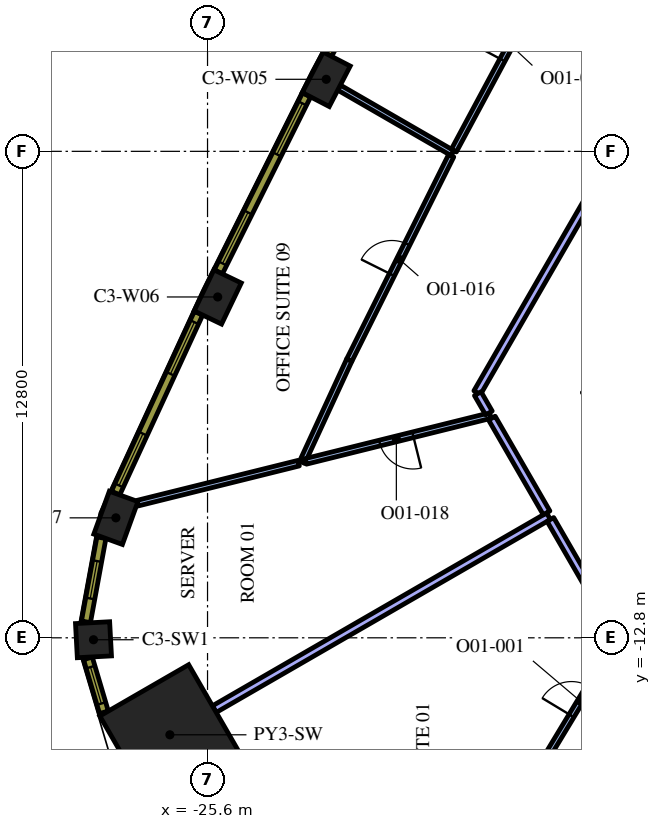
"""IFC4 building model, lengths in metres.
Left out: names, types, materials, properties, quantities, classifications, styles, units other than length and angle.
Written with IfcOpenShell. Run it as: python <this file> out.ifc"""

import sys

from ifc_helpers import new_model, si_unit, direction, frame, frame_2d, origin, origin_2d, place, context, subcontext, project, spatial, rectangle, extrude, element, fill, save


model = new_model("IFC4")
c1 = context("Model", 3, precision=1e-05, world=origin(), true_north=direction((0.0, 1.0)))
c2 = subcontext(c1, "Body", "Model", "MODEL_VIEW")
j1 = project(units=[si_unit("LENGTHUNIT", "METRE"), si_unit("PLANEANGLEUNIT", "RADIAN")], contexts=[c1])
p1 = place(None, origin())
s1 = spatial("IfcSite", under=j1, at=p1, CompositionType="ELEMENT")
p2 = place(p1, origin())
s2 = spatial("IfcBuilding", under=s1, at=p2, CompositionType="ELEMENT")
p3 = place(p2, frame((0.0, 0.0, 141.6)))
s3 = spatial("IfcBuildingStorey", under=s2, at=p3, CompositionType="ELEMENT", Elevation=141.6)
p4 = place(p3, frame((-26.591, -15.352, 0.0), z_axis=(0.0, 0.0, 1.0), x_axis=(-0.866025403784, -0.5, 0.0)))
e1 = element("IfcColumn", 1, at=p4, inside=s3, PredefinedType="COLUMN", context=c2, shape_type="SweptSolid", body=[
    extrude(rectangle(XDim=2.7, YDim=2.7, at=origin_2d()), origin(), (0.0, 0.0, 1.0), 4.2),
])
for number, where, z_axis, x_axis in (
    (2, (-22.476, 1.896, 0.0), (0.0, 0.0, 1.0), (-0.46, -0.888, 0.0)),
    (3, (-25.332, -3.832, 0.0), (0.0, 0.0, 1.0), (-0.433, -0.902, 0.0)),
    (4, (-28.012, -9.644, 0.0), (0.0, 0.0, 1.0), (-0.341, -0.94, 0.0)),
):
    element("IfcColumn", number, at=place(p3, frame(where, z_axis=z_axis, x_axis=x_axis)), inside=s3, PredefinedType="COLUMN", context=c2, shape_type="SweptSolid", body=[
        extrude(rectangle(XDim=1.2, YDim=0.8, at=origin_2d()), origin(), (0.0, 0.0, 1.0), 4.2),
    ])
p5 = place(p3, frame((-28.601, -12.851, 0.0), z_axis=(0.0, 0.0, 1.0), x_axis=(0.0533921468, -0.998573622053, 0.0)))
e5 = element("IfcColumn", 5, at=p5, inside=s3, PredefinedType="COLUMN", context=c2, shape_type="SweptSolid", body=[
    extrude(rectangle(XDim=0.9, YDim=0.9, at=origin_2d()), origin(), (0.0, 0.0, 1.0), 4.2),
])
p6 = place(p3, frame((-16.775, -16.097, 0.0), z_axis=(0.0, 0.0, 1.0), x_axis=(0.516793803756, 0.856109902057, 0.0)))
e6 = element("IfcWall", 6, at=p6, inside=s3, PredefinedType="PARTITIONING", context=c2, shape_type="SweptSolid", body=[
    extrude(rectangle(XDim=3.856, YDim=0.15, at=frame_2d((1.928, 0.0))), origin(), (0.0, 0.0, 1.0), 3.15),
])
p7 = place(p6, frame((1.456, 0.0, 0.0)))
e7 = element("IfcOpeningElement", 7, at=p7, cuts=e6, PredefinedType="OPENING", context=c2, shape_type="SweptSolid", body=[
    extrude(rectangle(XDim=0.9, YDim=2.1, at=frame_2d((0.45, 1.05))), frame((0.0, 0.085, 0.0), z_axis=(0.0, -1.0, 0.0), x_axis=(1.0, 0.0, 0.0)), (0.0, 0.0, 1.0), 0.17),
])
p8 = place(p3, frame((-25.421, -14.677, 0.0), z_axis=(0.0, 0.0, 1.0), x_axis=(0.866031435434, 0.499989552732, 0.0)))
e8 = element("IfcWall", 8, at=p8, inside=s3, PredefinedType="PARTITIONING", context=c2, shape_type="SweptSolid", body=[
    extrude(rectangle(XDim=10.154, YDim=0.2, at=frame_2d((5.077, 0.0))), origin(), (0.0, 0.0, 1.0), 3.15),
])
p9 = place(p3, frame((-16.578, -9.687, 0.0), z_axis=(0.0, 0.0, 1.0), x_axis=(0.499981686864, -0.86603597662, 0.0)))
e9 = element("IfcWall", 9, at=p9, inside=s3, PredefinedType="PARTITIONING", context=c2, shape_type="SweptSolid", body=[
    extrude(rectangle(XDim=3.506, YDim=0.2, at=frame_2d((1.753, 0.0))), origin(), (0.0, 0.0, 1.0), 3.15),
])
p10 = place(p3, frame((-19.154, -0.046, 0.0), z_axis=(0.0, 0.0, 1.0), x_axis=(-0.866051136095, 0.499955427682, 0.0)))
e10 = element("IfcWall", 10, at=p10, inside=s3, PredefinedType="PARTITIONING", context=c2, shape_type="SweptSolid", body=[
    extrude(rectangle(XDim=3.447, YDim=0.15, at=frame_2d((1.724, 0.0))), origin(), (0.0, 0.0, 1.0), 3.15),
])
p11 = place(p3, frame((-19.118, 0.02, 0.0), z_axis=(0.0, 0.0, 1.0), x_axis=(0.47251230182, 0.88132407469, 0.0)))
e11 = element("IfcWall", 11, at=p11, inside=s3, PredefinedType="PARTITIONING", context=c2, shape_type="SweptSolid", body=[
    extrude(rectangle(XDim=6.404, YDim=0.15, at=frame_2d((3.202, 0.0))), origin(), (0.0, 0.0, 1.0), 3.15),
])
p12 = place(p11, frame((2.704, 0.0, 0.0)))
e12 = element("IfcOpeningElement", 12, at=p12, cuts=e11, PredefinedType="OPENING", context=c2, shape_type="SweptSolid", body=[
    extrude(rectangle(XDim=0.9, YDim=2.1, at=frame_2d((0.45, 1.05))), frame((0.0, 0.085, 0.0), z_axis=(0.0, -1.0, 0.0), x_axis=(1.0, 0.0, 0.0)), (0.0, 0.0, 1.0), 0.17),
])
p13 = place(p3, frame((-21.869, -5.493, 0.0), z_axis=(0.0, 0.0, 1.0), x_axis=(0.44618972677, 0.894938393257, 0.0)))
e13 = element("IfcWall", 13, at=p13, inside=s3, PredefinedType="PARTITIONING", context=c2, shape_type="SweptSolid", body=[
    extrude(rectangle(XDim=6.011, YDim=0.15, at=frame_2d((3.005, 0.0))), origin(), (0.0, 0.0, 1.0), 3.15),
])
p14 = place(p13, frame((2.511, 0.0, 0.0)))
e14 = element("IfcOpeningElement", 14, at=p14, cuts=e13, PredefinedType="OPENING", context=c2, shape_type="SweptSolid", body=[
    extrude(rectangle(XDim=0.9, YDim=2.1, at=frame_2d((0.45, 1.05))), frame((0.0, 0.085, 0.0), z_axis=(0.0, -1.0, 0.0), x_axis=(1.0, 0.0, 0.0)), (0.0, 0.0, 1.0), 0.17),
])
p15 = place(p3, frame((-21.869, -5.493, 0.0), z_axis=(0.0, 0.0, 1.0), x_axis=(-0.418791486232, -0.908082425256, 0.0)))
e15 = element("IfcWall", 15, at=p15, inside=s3, PredefinedType="PARTITIONING", context=c2, shape_type="SweptSolid", body=[
    extrude(rectangle(XDim=2.961, YDim=0.15, at=frame_2d((1.48, 0.0))), origin(), (0.0, 0.0, 1.0), 3.15),
])
p16 = place(p3, frame((-23.203, -8.205, 0.0), z_axis=(0.0, 0.0, 1.0), x_axis=(-0.970525493326, -0.240998478843, 0.0)))
e16 = element("IfcWall", 16, at=p16, inside=s3, PredefinedType="PARTITIONING", context=c2, shape_type="SweptSolid", body=[
    extrude(rectangle(XDim=4.373, YDim=0.15, at=frame_2d((2.187, 0.0))), origin(), (0.0, 0.0, 1.0), 3.15),
])
p17 = place(p3, frame((-18.156, -6.952, 0.0), z_axis=(0.0, 0.0, 1.0), x_axis=(-0.97052275783, -0.241009494697, 0.0)))
e17 = element("IfcWall", 17, at=p17, inside=s3, PredefinedType="PARTITIONING", context=c2, shape_type="SweptSolid", body=[
    extrude(rectangle(XDim=5.007, YDim=0.15, at=frame_2d((2.504, 0.0))), origin(), (0.0, 0.0, 1.0), 3.15),
])
p18 = place(p17, frame((2.1, 0.0, 0.0)))
e18 = element("IfcOpeningElement", 18, at=p18, cuts=e17, PredefinedType="OPENING", context=c2, shape_type="SweptSolid", body=[
    extrude(rectangle(XDim=0.9, YDim=2.1, at=frame_2d((0.45, 1.05))), frame((0.0, 0.085, 0.0), z_axis=(0.0, -1.0, 0.0), x_axis=(1.0, 0.0, 0.0)), (0.0, 0.0, 1.0), 0.17),
])
p19 = place(p3, frame((-13.643, 2.069, 0.0), z_axis=(0.0, 0.0, 1.0), x_axis=(-0.500012305324, -0.866018299186, 0.0)))
e19 = element("IfcWall", 19, at=p19, inside=s3, PredefinedType="PARTITIONING", context=c2, shape_type="SweptSolid", body=[
    extrude(rectangle(XDim=9.721, YDim=0.2, at=frame_2d((4.861, 0.0))), origin(), (0.0, 0.0, 1.0), 3.15),
])
p20 = place(p3, frame((-18.489, -6.376, 0.0), z_axis=(0.0, 0.0, 1.0), x_axis=(0.499986503906, -0.866033195618, 0.0)))
e20 = element("IfcWall", 20, at=p20, inside=s3, PredefinedType="PARTITIONING", context=c2, shape_type="SweptSolid", body=[
    extrude(rectangle(XDim=0.587, YDim=0.2, at=frame_2d((0.293, 0.0))), origin(), (0.0, 0.0, 1.0), 3.15),
])
p21 = place(p3, frame((-18.118, -7.02, 0.0), z_axis=(0.0, 0.0, 1.0), x_axis=(0.500023335103, -0.866011930837, 0.0)))
e21 = element("IfcWall", 21, at=p21, inside=s3, PredefinedType="PARTITIONING", context=c2, shape_type="SweptSolid", body=[
    extrude(rectangle(XDim=2.88, YDim=0.2, at=frame_2d((1.44, 0.0))), origin(), (0.0, 0.0, 1.0), 3.15),
])
p22 = place(p3, frame((-19.977, 7.139, 0.0), z_axis=(0.0, 0.0, 1.0), x_axis=(-0.473349833294, -0.880874528704, 0.0)))
e22 = element("IfcWall", 22, at=p22, inside=s3, PredefinedType="SOLIDWALL", context=c2, shape_type="SweptSolid", body=[
    extrude(rectangle(XDim=5.204, YDim=0.24, at=frame_2d((2.602, 0.0))), origin(), (0.0, 0.0, 1.0), 3.95),
])
p23 = place(p22, frame((0.248, 0.0, 0.9)))
e23 = element("IfcOpeningElement", 23, at=p23, cuts=e22, PredefinedType="OPENING", context=c2, shape_type="SweptSolid", body=[
    extrude(rectangle(XDim=1.5, YDim=2.55, at=frame_2d((0.75, 1.275))), frame((0.0, 0.13, 0.0), z_axis=(0.0, -1.0, 0.0), x_axis=(1.0, 0.0, 0.0)), (0.0, 0.0, 1.0), 0.26),
])
p24 = place(p22, frame((3.455, 0.0, 0.9)))
e24 = element("IfcOpeningElement", 24, at=p24, cuts=e22, PredefinedType="OPENING", context=c2, shape_type="SweptSolid", body=[
    extrude(rectangle(XDim=1.5, YDim=2.55, at=frame_2d((0.75, 1.275))), frame((0.0, 0.13, 0.0), z_axis=(0.0, -1.0, 0.0), x_axis=(1.0, 0.0, 0.0)), (0.0, 0.0, 1.0), 0.26),
])
p25 = place(p3, frame((-22.994, 1.485, 0.0), z_axis=(0.0, 0.0, 1.0), x_axis=(-0.446256171312, -0.8949052629, 0.0)))
e25 = element("IfcWall", 25, at=p25, inside=s3, PredefinedType="SOLIDWALL", context=c2, shape_type="SweptSolid", body=[
    extrude(rectangle(XDim=5.203, YDim=0.24, at=frame_2d((2.602, 0.0))), origin(), (0.0, 0.0, 1.0), 3.95),
])
p26 = place(p25, frame((0.248, 0.0, 0.9)))
e26 = element("IfcOpeningElement", 26, at=p26, cuts=e25, PredefinedType="OPENING", context=c2, shape_type="SweptSolid", body=[
    extrude(rectangle(XDim=1.5, YDim=2.55, at=frame_2d((0.75, 1.275))), frame((0.0, 0.13, 0.0), z_axis=(0.0, -1.0, 0.0), x_axis=(1.0, 0.0, 0.0)), (0.0, 0.0, 1.0), 0.26),
])
p27 = place(p25, frame((3.455, 0.0, 0.9)))
e27 = element("IfcOpeningElement", 27, at=p27, cuts=e25, PredefinedType="OPENING", context=c2, shape_type="SweptSolid", body=[
    extrude(rectangle(XDim=1.5, YDim=2.55, at=frame_2d((0.75, 1.275))), frame((0.0, 0.13, 0.0), z_axis=(0.0, -1.0, 0.0), x_axis=(1.0, 0.0, 0.0)), (0.0, 0.0, 1.0), 0.26),
])
p28 = place(p3, frame((-25.837, -4.258, 0.0), z_axis=(0.0, 0.0, 1.0), x_axis=(-0.418722559465, -0.908114209885, 0.0)))
e28 = element("IfcWall", 28, at=p28, inside=s3, PredefinedType="SOLIDWALL", context=c2, shape_type="SweptSolid", body=[
    extrude(rectangle(XDim=5.213, YDim=0.24, at=frame_2d((2.606, 0.0))), origin(), (0.0, 0.0, 1.0), 3.95),
])
p29 = place(p28, frame((0.261, 0.0, 0.9)))
e29 = element("IfcOpeningElement", 29, at=p29, cuts=e28, PredefinedType="OPENING", context=c2, shape_type="SweptSolid", body=[
    extrude(rectangle(XDim=1.5, YDim=2.55, at=frame_2d((0.75, 1.275))), frame((0.0, 0.13, 0.0), z_axis=(0.0, -1.0, 0.0), x_axis=(1.0, 0.0, 0.0)), (0.0, 0.0, 1.0), 0.26),
])
p30 = place(p28, frame((3.492, 0.0, 0.9)))
e30 = element("IfcOpeningElement", 30, at=p30, cuts=e28, PredefinedType="OPENING", context=c2, shape_type="SweptSolid", body=[
    extrude(rectangle(XDim=1.5, YDim=2.55, at=frame_2d((0.75, 1.275))), frame((0.0, 0.13, 0.0), z_axis=(0.0, -1.0, 0.0), x_axis=(1.0, 0.0, 0.0)), (0.0, 0.0, 1.0), 0.26),
])
p31 = place(p3, frame((-28.393, -10.167, 0.0), z_axis=(0.0, 0.0, 1.0), x_axis=(-0.180737189259, -0.983531427265, 0.0)))
e31 = element("IfcWall", 31, at=p31, inside=s3, PredefinedType="SOLIDWALL", context=c2, shape_type="SweptSolid", body=[
    extrude(rectangle(XDim=2.25, YDim=0.24, at=frame_2d((1.125, 0.0))), origin(), (0.0, 0.0, 1.0), 3.95),
])
p32 = place(p31, frame((0.625, 0.0, 0.9)))
e32 = element("IfcOpeningElement", 32, at=p32, cuts=e31, PredefinedType="OPENING", context=c2, shape_type="SweptSolid", body=[
    extrude(rectangle(XDim=1.0, YDim=2.55, at=frame_2d((0.5, 1.275))), frame((0.0, 0.13, 0.0), z_axis=(0.0, -1.0, 0.0), x_axis=(1.0, 0.0, 0.0)), (0.0, 0.0, 1.0), 0.26),
])
p33 = place(p3, frame((-28.748, -13.34, 0.0), z_axis=(0.0, 0.0, 1.0), x_axis=(0.284413721403, -0.958701640281, 0.0)))
e33 = element("IfcWall", 33, at=p33, inside=s3, PredefinedType="SOLIDWALL", context=c2, shape_type="SweptSolid", body=[
    extrude(rectangle(XDim=1.482, YDim=0.24, at=frame_2d((0.741, 0.0))), origin(), (0.0, 0.0, 1.0), 3.95),
])
p34 = place(p33, frame((0.241, 0.0, 0.9)))
e34 = element("IfcOpeningElement", 34, at=p34, cuts=e33, PredefinedType="OPENING", context=c2, shape_type="SweptSolid", body=[
    extrude(rectangle(XDim=1.0, YDim=2.55, at=frame_2d((0.5, 1.275))), frame((0.0, 0.13, 0.0), z_axis=(0.0, -1.0, 0.0), x_axis=(1.0, 0.0, 0.0)), (0.0, 0.0, 1.0), 0.26),
])
p35 = place(p7, origin())
e35 = element("IfcDoor", 35, at=p35, inside=s3, OperationType="SINGLE_SWING_LEFT", PredefinedType="DOOR", context=c2, shape_type="SweptSolid", body=[
    extrude(rectangle(XDim=0.9, YDim=2.1, at=frame_2d((0.45, 1.05))), frame((0.0, 0.025, 0.0), z_axis=(0.0, -1.0, 0.0), x_axis=(1.0, 0.0, 0.0)), (0.0, 0.0, 1.0), 0.05),
])
fill(e7, e35)
p36 = place(p12, origin())
e36 = element("IfcDoor", 36, at=p36, inside=s3, OperationType="SINGLE_SWING_LEFT", PredefinedType="DOOR", context=c2, shape_type="SweptSolid", body=[
    extrude(rectangle(XDim=0.9, YDim=2.1, at=frame_2d((0.45, 1.05))), frame((0.0, 0.025, 0.0), z_axis=(0.0, -1.0, 0.0), x_axis=(1.0, 0.0, 0.0)), (0.0, 0.0, 1.0), 0.05),
])
fill(e12, e36)
p37 = place(p14, origin())
e37 = element("IfcDoor", 37, at=p37, inside=s3, OperationType="SINGLE_SWING_LEFT", PredefinedType="DOOR", context=c2, shape_type="SweptSolid", body=[
    extrude(rectangle(XDim=0.9, YDim=2.1, at=frame_2d((0.45, 1.05))), frame((0.0, 0.025, 0.0), z_axis=(0.0, -1.0, 0.0), x_axis=(1.0, 0.0, 0.0)), (0.0, 0.0, 1.0), 0.05),
])
fill(e14, e37)
p38 = place(p18, origin())
e38 = element("IfcDoor", 38, at=p38, inside=s3, OperationType="SINGLE_SWING_RIGHT", PredefinedType="DOOR", context=c2, shape_type="SweptSolid", body=[
    extrude(rectangle(XDim=0.9, YDim=2.1, at=frame_2d((0.45, 1.05))), frame((0.0, 0.025, 0.0), z_axis=(0.0, -1.0, 0.0), x_axis=(1.0, 0.0, 0.0)), (0.0, 0.0, 1.0), 0.05),
])
fill(e18, e38)
p39 = place(p26, origin())
e39 = element("IfcWindow", 39, at=p39, inside=s3, PartitioningType="SINGLE_PANEL", PredefinedType="WINDOW", context=c2, shape_type="SweptSolid", body=[
    extrude(rectangle(XDim=1.5, YDim=2.55, at=frame_2d((0.75, 1.275))), frame((0.0, 0.04, 0.0), z_axis=(0.0, -1.0, 0.0), x_axis=(1.0, 0.0, 0.0)), (0.0, 0.0, 1.0), 0.06),
])
fill(e26, e39)
p40 = place(p27, origin())
e40 = element("IfcWindow", 40, at=p40, inside=s3, PartitioningType="SINGLE_PANEL", PredefinedType="WINDOW", context=c2, shape_type="SweptSolid", body=[
    extrude(rectangle(XDim=1.5, YDim=2.55, at=frame_2d((0.75, 1.275))), frame((0.0, 0.04, 0.0), z_axis=(0.0, -1.0, 0.0), x_axis=(1.0, 0.0, 0.0)), (0.0, 0.0, 1.0), 0.06),
])
fill(e27, e40)
p41 = place(p29, origin())
e41 = element("IfcWindow", 41, at=p41, inside=s3, PartitioningType="SINGLE_PANEL", PredefinedType="WINDOW", context=c2, shape_type="SweptSolid", body=[
    extrude(rectangle(XDim=1.5, YDim=2.55, at=frame_2d((0.75, 1.275))), frame((0.0, 0.04, 0.0), z_axis=(0.0, -1.0, 0.0), x_axis=(1.0, 0.0, 0.0)), (0.0, 0.0, 1.0), 0.06),
])
fill(e29, e41)
p42 = place(p30, origin())
e42 = element("IfcWindow", 42, at=p42, inside=s3, PartitioningType="SINGLE_PANEL", PredefinedType="WINDOW", context=c2, shape_type="SweptSolid", body=[
    extrude(rectangle(XDim=1.5, YDim=2.55, at=frame_2d((0.75, 1.275))), frame((0.0, 0.04, 0.0), z_axis=(0.0, -1.0, 0.0), x_axis=(1.0, 0.0, 0.0)), (0.0, 0.0, 1.0), 0.06),
])
fill(e30, e42)
p43 = place(p32, origin())
e43 = element("IfcWindow", 43, at=p43, inside=s3, PartitioningType="SINGLE_PANEL", PredefinedType="WINDOW", context=c2, shape_type="SweptSolid", body=[
    extrude(rectangle(XDim=1.0, YDim=2.55, at=frame_2d((0.5, 1.275))), frame((0.0, 0.04, 0.0), z_axis=(0.0, -1.0, 0.0), x_axis=(1.0, 0.0, 0.0)), (0.0, 0.0, 1.0), 0.06),
])
fill(e32, e43)
p44 = place(p34, origin())
e44 = element("IfcWindow", 44, at=p44, inside=s3, PartitioningType="SINGLE_PANEL", PredefinedType="WINDOW", context=c2, shape_type="SweptSolid", body=[
    extrude(rectangle(XDim=1.0, YDim=2.55, at=frame_2d((0.5, 1.275))), frame((0.0, 0.04, 0.0), z_axis=(0.0, -1.0, 0.0), x_axis=(1.0, 0.0, 0.0)), (0.0, 0.0, 1.0), 0.06),
])
fill(e34, e44)
save(model, sys.argv[1])
